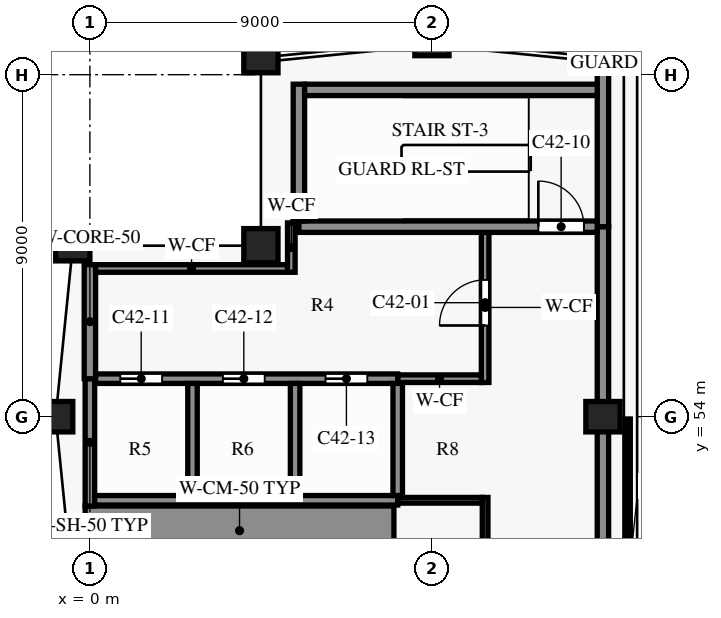
"""IFC4 building model, lengths in metres.
Left out: names, types, materials, properties, quantities, classifications, styles, units other than length and angle.
Written with IfcOpenShell. Run it as: python <this file> out.ifc"""

import sys

from ifc_helpers import new_model, si_unit, direction, frame, frame_2d, origin, origin_2d, place, context, subcontext, project, spatial, rectangle, extrude, element, fill, save


model = new_model("IFC4")
c1 = context("Model", 3, precision=1e-05, world=origin(), true_north=direction((0.0, 1.0)))
c2 = subcontext(c1, "Body", "Model", "MODEL_VIEW")
j1 = project(units=[si_unit("LENGTHUNIT", "METRE"), si_unit("PLANEANGLEUNIT", "RADIAN")], contexts=[c1])
p1 = place(None, origin())
s1 = spatial("IfcSite", under=j1, at=p1, CompositionType="ELEMENT")
p2 = place(p1, origin())
s2 = spatial("IfcBuilding", under=s1, at=p2, CompositionType="ELEMENT")
p3 = place(p2, frame((0.0, 0.0, 290.8)))
s3 = spatial("IfcBuildingStorey", under=s2, at=p3, CompositionType="ELEMENT", Elevation=290.8)
for number, where, z_axis, x_axis in (
    (1, (13.5, 54.0, 0.0), (0.0, 0.0, 1.0), (1.0, 0.0, 0.0)),
    (2, (13.5, 63.45, 0.0), (0.0, 0.0, 1.0), (-0.995, 0.1, 0.0)),
    (3, (9.0, 63.9, 0.0), (0.0, 0.0, 1.0), (-1.0, 0.0, 0.0)),
    (4, (4.5, 63.45, 0.0), (0.0, 0.0, 1.0), (-0.995, -0.1, 0.0)),
    (5, (-0.45, 58.5, 0.0), (0.0, 0.0, 1.0), (-0.1, -0.995, 0.0)),
    (6, (-0.9, 54.0, 0.0), (0.0, 0.0, 1.0), (0.0, -1.0, 0.0)),
):
    element("IfcColumn", number, at=place(p3, frame(where, z_axis=z_axis, x_axis=x_axis)), inside=s3, PredefinedType="COLUMN", context=c2, shape_type="SweptSolid", body=[
        extrude(rectangle(XDim=0.9, YDim=0.8, at=origin_2d()), origin(), (0.0, 0.0, 1.0), 4.0),
    ])
p4 = place(p3, frame((4.5, 58.5, 0.0), z_axis=(0.0, 0.0, 1.0), x_axis=(1.0, 0.0, 0.0)))
e7 = element("IfcColumn", 7, at=p4, inside=s3, PredefinedType="COLUMN", context=c2, shape_type="SweptSolid", body=[
    extrude(rectangle(XDim=0.9, YDim=0.9, at=origin_2d()), origin(), (0.0, 0.0, 1.0), 4.0),
])
p5 = place(p3, frame((-0.125, 51.0, 0.0), z_axis=(0.0, 0.0, 1.0), x_axis=(1.0, 0.0, 0.0)))
e8 = element("IfcWall", 8, at=p5, inside=s3, PredefinedType="SHEAR", context=c2, shape_type="SweptSolid", body=[
    extrude(rectangle(XDim=8.125, YDim=1.3, at=frame_2d((4.062, 0.0))), origin(), (0.0, 0.0, 1.0), 3.7),
])
p6 = place(p3, frame((8.1, 51.8, 0.0), z_axis=(0.0, 0.0, 1.0), x_axis=(1.0, 0.0, 0.0)))
e9 = element("IfcWall", 9, at=p6, inside=s3, PredefinedType="PARTITIONING", context=c2, shape_type="SweptSolid", body=[
    extrude(rectangle(XDim=2.225, YDim=0.15, at=frame_2d((1.112, 0.0))), origin(), (0.0, 0.0, 1.0), 3.7),
])
p7 = place(p3, frame((0.125, 51.8, 0.0), z_axis=(0.0, 0.0, 1.0), x_axis=(1.0, 0.0, 0.0)))
e10 = element("IfcWall", 10, at=p7, inside=s3, PredefinedType="SHEAR", context=c2, shape_type="SweptSolid", body=[
    extrude(rectangle(XDim=7.975, YDim=0.25, at=frame_2d((3.988, 0.0))), origin(), (0.0, 0.0, 1.0), 3.7),
])
p8 = place(p3, frame((8.1, 55.0, 0.0), z_axis=(0.0, 0.0, 1.0), x_axis=(1.0, 0.0, 0.0)))
e11 = element("IfcWall", 11, at=p8, inside=s3, PredefinedType="PARTITIONING", context=c2, shape_type="SweptSolid", body=[
    extrude(rectangle(XDim=2.2, YDim=0.2, at=frame_2d((1.1, 0.0))), origin(), (0.0, 0.0, 1.0), 3.7),
])
p9 = place(p3, frame((0.15, 55.0, 0.0), z_axis=(0.0, 0.0, 1.0), x_axis=(1.0, 0.0, 0.0)))
e12 = element("IfcWall", 12, at=p9, inside=s3, PredefinedType="SHEAR", context=c2, shape_type="SweptSolid", body=[
    extrude(rectangle(XDim=7.95, YDim=0.25, at=frame_2d((3.975, 0.0))), origin(), (0.0, 0.0, 1.0), 3.7),
])
p10 = place(p9, frame((0.65, 0.0, 0.0)))
e13 = element("IfcOpeningElement", 13, at=p10, cuts=e12, PredefinedType="OPENING", context=c2, shape_type="SweptSolid", body=[
    extrude(rectangle(XDim=1.1, YDim=2.1, at=frame_2d((0.55, 1.05))), frame((0.0, 0.135, 0.0), z_axis=(0.0, -1.0, 0.0), x_axis=(1.0, 0.0, 0.0)), (0.0, 0.0, 1.0), 0.27),
])
p11 = place(p9, frame((3.35, 0.0, 0.0)))
e14 = element("IfcOpeningElement", 14, at=p11, cuts=e12, PredefinedType="OPENING", context=c2, shape_type="SweptSolid", body=[
    extrude(rectangle(XDim=1.1, YDim=2.1, at=frame_2d((0.55, 1.05))), frame((0.0, 0.135, 0.0), z_axis=(0.0, -1.0, 0.0), x_axis=(1.0, 0.0, 0.0)), (0.0, 0.0, 1.0), 0.27),
])
p12 = place(p9, frame((6.05, 0.0, 0.0)))
e15 = element("IfcOpeningElement", 15, at=p12, cuts=e12, PredefinedType="OPENING", context=c2, shape_type="SweptSolid", body=[
    extrude(rectangle(XDim=1.1, YDim=2.1, at=frame_2d((0.55, 1.05))), frame((0.0, 0.135, 0.0), z_axis=(0.0, -1.0, 0.0), x_axis=(1.0, 0.0, 0.0)), (0.0, 0.0, 1.0), 0.27),
])
p13 = place(p3, frame((0.15, 57.9, 0.0), z_axis=(0.0, 0.0, 1.0), x_axis=(1.0, 0.0, 0.0)))
e16 = element("IfcWall", 16, at=p13, inside=s3, PredefinedType="PARTITIONING", context=c2, shape_type="SweptSolid", body=[
    extrude(rectangle(XDim=5.05, YDim=0.2, at=frame_2d((2.525, 0.0))), origin(), (0.0, 0.0, 1.0), 3.7),
])
p14 = place(p3, frame((5.5, 59.0, 0.0), z_axis=(0.0, 0.0, 1.0), x_axis=(1.0, 0.0, 0.0)))
e17 = element("IfcWall", 17, at=p14, inside=s3, PredefinedType="SHEAR", context=c2, shape_type="SweptSolid", body=[
    extrude(rectangle(XDim=7.85, YDim=0.3, at=frame_2d((3.925, 0.0))), origin(), (0.0, 0.0, 1.0), 3.7),
])
p15 = place(p14, frame((6.3, 0.0, 0.0)))
e18 = element("IfcOpeningElement", 18, at=p15, cuts=e17, PredefinedType="OPENING", context=c2, shape_type="SweptSolid", body=[
    extrude(rectangle(XDim=1.2, YDim=2.2, at=frame_2d((0.6, 1.1))), frame((0.0, 0.16, 0.0), z_axis=(0.0, -1.0, 0.0), x_axis=(1.0, 0.0, 0.0)), (0.0, 0.0, 1.0), 0.32),
])
p16 = place(p3, frame((5.65, 62.6, 0.0), z_axis=(0.0, 0.0, 1.0), x_axis=(1.0, 0.0, 0.0)))
e19 = element("IfcWall", 19, at=p16, inside=s3, PredefinedType="SHEAR", context=c2, shape_type="SweptSolid", body=[
    extrude(rectangle(XDim=7.7, YDim=0.3, at=frame_2d((3.85, 0.0))), origin(), (0.0, 0.0, 1.0), 3.7),
])
p17 = place(p3, frame((0.0, 55.0, 0.0), z_axis=(0.0, 0.0, 1.0), x_axis=(0.0, 1.0, 0.0)))
e20 = element("IfcWall", 20, at=p17, inside=s3, PredefinedType="SHEAR", context=c2, shape_type="SweptSolid", body=[
    extrude(rectangle(XDim=3.0, YDim=0.3, at=frame_2d((1.5, 0.0))), origin(), (0.0, 0.0, 1.0), 3.7),
])
p18 = place(p3, frame((0.0, 51.65, 0.0), z_axis=(0.0, 0.0, 1.0), x_axis=(0.0, 1.0, 0.0)))
e21 = element("IfcWall", 21, at=p18, inside=s3, PredefinedType="SHEAR", context=c2, shape_type="SweptSolid", body=[
    extrude(rectangle(XDim=3.35, YDim=0.25, at=frame_2d((1.675, 0.0))), origin(), (0.0, 0.0, 1.0), 3.7),
])
p19 = place(p3, frame((2.7, 51.925, 0.0), z_axis=(0.0, 0.0, 1.0), x_axis=(0.0, 1.0, 0.0)))
e22 = element("IfcWall", 22, at=p19, inside=s3, PredefinedType="SHEAR", context=c2, shape_type="SweptSolid", body=[
    extrude(rectangle(XDim=2.95, YDim=0.25, at=frame_2d((1.475, 0.0))), origin(), (0.0, 0.0, 1.0), 3.7),
])
p20 = place(p3, frame((5.3, 57.8, 0.0), z_axis=(0.0, 0.0, 1.0), x_axis=(0.0, 1.0, 0.0)))
e23 = element("IfcWall", 23, at=p20, inside=s3, PredefinedType="PARTITIONING", context=c2, shape_type="SweptSolid", body=[
    extrude(rectangle(XDim=1.3, YDim=0.2, at=frame_2d((0.65, 0.0))), origin(), (0.0, 0.0, 1.0), 3.7),
])
p21 = place(p3, frame((5.4, 51.925, 0.0), z_axis=(0.0, 0.0, 1.0), x_axis=(0.0, 1.0, 0.0)))
e24 = element("IfcWall", 24, at=p21, inside=s3, PredefinedType="SHEAR", context=c2, shape_type="SweptSolid", body=[
    extrude(rectangle(XDim=2.95, YDim=0.25, at=frame_2d((1.475, 0.0))), origin(), (0.0, 0.0, 1.0), 3.7),
])
p22 = place(p3, frame((5.5, 59.15, 0.0), z_axis=(0.0, 0.0, 1.0), x_axis=(0.0, 1.0, 0.0)))
e25 = element("IfcWall", 25, at=p22, inside=s3, PredefinedType="SHEAR", context=c2, shape_type="SweptSolid", body=[
    extrude(rectangle(XDim=3.6, YDim=0.3, at=frame_2d((1.8, 0.0))), origin(), (0.0, 0.0, 1.0), 3.7),
])
p23 = place(p3, frame((8.1, 51.925, 0.0), z_axis=(0.0, 0.0, 1.0), x_axis=(0.0, 1.0, 0.0)))
e26 = element("IfcWall", 26, at=p23, inside=s3, PredefinedType="SHEAR", context=c2, shape_type="SweptSolid", body=[
    extrude(rectangle(XDim=2.95, YDim=0.25, at=frame_2d((1.475, 0.0))), origin(), (0.0, 0.0, 1.0), 3.7),
])
p24 = place(p3, frame((10.4, 54.9, 0.0), z_axis=(0.0, 0.0, 1.0), x_axis=(0.0, 1.0, 0.0)))
e27 = element("IfcWall", 27, at=p24, inside=s3, PredefinedType="PARTITIONING", context=c2, shape_type="SweptSolid", body=[
    extrude(rectangle(XDim=3.95, YDim=0.2, at=frame_2d((1.975, 0.0))), origin(), (0.0, 0.0, 1.0), 3.7),
])
p25 = place(p24, frame((1.5, 0.0, 0.0)))
e28 = element("IfcOpeningElement", 28, at=p25, cuts=e27, PredefinedType="OPENING", context=c2, shape_type="SweptSolid", body=[
    extrude(rectangle(XDim=1.2, YDim=2.2, at=frame_2d((0.6, 1.1))), frame((0.0, 0.11, 0.0), z_axis=(0.0, -1.0, 0.0), x_axis=(1.0, 0.0, 0.0)), (0.0, 0.0, 1.0), 0.22),
])
p26 = place(p3, frame((10.4, 50.2, 0.0), z_axis=(0.0, 0.0, 1.0), x_axis=(0.0, 1.0, 0.0)))
e29 = element("IfcWall", 29, at=p26, inside=s3, PredefinedType="PARTITIONING", context=c2, shape_type="SweptSolid", body=[
    extrude(rectangle(XDim=1.675, YDim=0.15, at=frame_2d((0.837, 0.0))), origin(), (0.0, 0.0, 1.0), 3.7),
])
p27 = place(p3, frame((13.5, 39.925, 0.0), z_axis=(0.0, 0.0, 1.0), x_axis=(0.0, 1.0, 0.0)))
e30 = element("IfcWall", 30, at=p27, inside=s3, PredefinedType="SHEAR", context=c2, shape_type="SweptSolid", body=[
    extrude(rectangle(XDim=19.075, YDim=0.3, at=frame_2d((9.538, 0.0))), origin(), (0.0, 0.0, 1.0), 3.7),
])
p28 = place(p3, frame((13.5, 59.0, 0.0), z_axis=(0.0, 0.0, 1.0), x_axis=(0.0, 1.0, 0.0)))
e31 = element("IfcWall", 31, at=p28, inside=s3, PredefinedType="SHEAR", context=c2, shape_type="SweptSolid", body=[
    extrude(rectangle(XDim=4.048, YDim=0.3, at=frame_2d((2.024, 0.0))), origin(), (0.0, 0.0, 1.0), 3.7),
])
p29 = place(p25, origin())
e32 = element("IfcDoor", 32, at=p29, inside=s3, OperationType="SINGLE_SWING_RIGHT", PredefinedType="DOOR", context=c2, shape_type="SweptSolid", body=[
    extrude(rectangle(XDim=1.2, YDim=2.2, at=frame_2d((0.6, 1.1))), frame((0.0, 0.025, 0.0), z_axis=(0.0, -1.0, 0.0), x_axis=(1.0, 0.0, 0.0)), (0.0, 0.0, 1.0), 0.05),
])
fill(e28, e32)
p30 = place(p15, origin())
e33 = element("IfcDoor", 33, at=p30, inside=s3, OperationType="SINGLE_SWING_RIGHT", PredefinedType="DOOR", context=c2, shape_type="SweptSolid", body=[
    extrude(rectangle(XDim=1.2, YDim=2.2, at=frame_2d((0.6, 1.1))), frame((0.0, 0.025, 0.0), z_axis=(0.0, -1.0, 0.0), x_axis=(1.0, 0.0, 0.0)), (0.0, 0.0, 1.0), 0.05),
])
fill(e18, e33)
p31 = place(p10, origin())
e34 = element("IfcDoor", 34, at=p31, inside=s3, OperationType="DOUBLE_DOOR_SLIDING", PredefinedType="DOOR", context=c2, shape_type="SweptSolid", body=[
    extrude(rectangle(XDim=1.1, YDim=2.1, at=frame_2d((0.55, 1.05))), frame((0.0, 0.025, 0.0), z_axis=(0.0, -1.0, 0.0), x_axis=(1.0, 0.0, 0.0)), (0.0, 0.0, 1.0), 0.05),
])
fill(e13, e34)
p32 = place(p11, origin())
e35 = element("IfcDoor", 35, at=p32, inside=s3, OperationType="DOUBLE_DOOR_SLIDING", PredefinedType="DOOR", context=c2, shape_type="SweptSolid", body=[
    extrude(rectangle(XDim=1.1, YDim=2.1, at=frame_2d((0.55, 1.05))), frame((0.0, 0.025, 0.0), z_axis=(0.0, -1.0, 0.0), x_axis=(1.0, 0.0, 0.0)), (0.0, 0.0, 1.0), 0.05),
])
fill(e14, e35)
p33 = place(p12, origin())
e36 = element("IfcDoor", 36, at=p33, inside=s3, OperationType="DOUBLE_DOOR_SLIDING", PredefinedType="DOOR", context=c2, shape_type="SweptSolid", body=[
    extrude(rectangle(XDim=1.1, YDim=2.1, at=frame_2d((0.55, 1.05))), frame((0.0, 0.025, 0.0), z_axis=(0.0, -1.0, 0.0), x_axis=(1.0, 0.0, 0.0)), (0.0, 0.0, 1.0), 0.05),
])
fill(e15, e36)
save(model, sys.argv[1])
